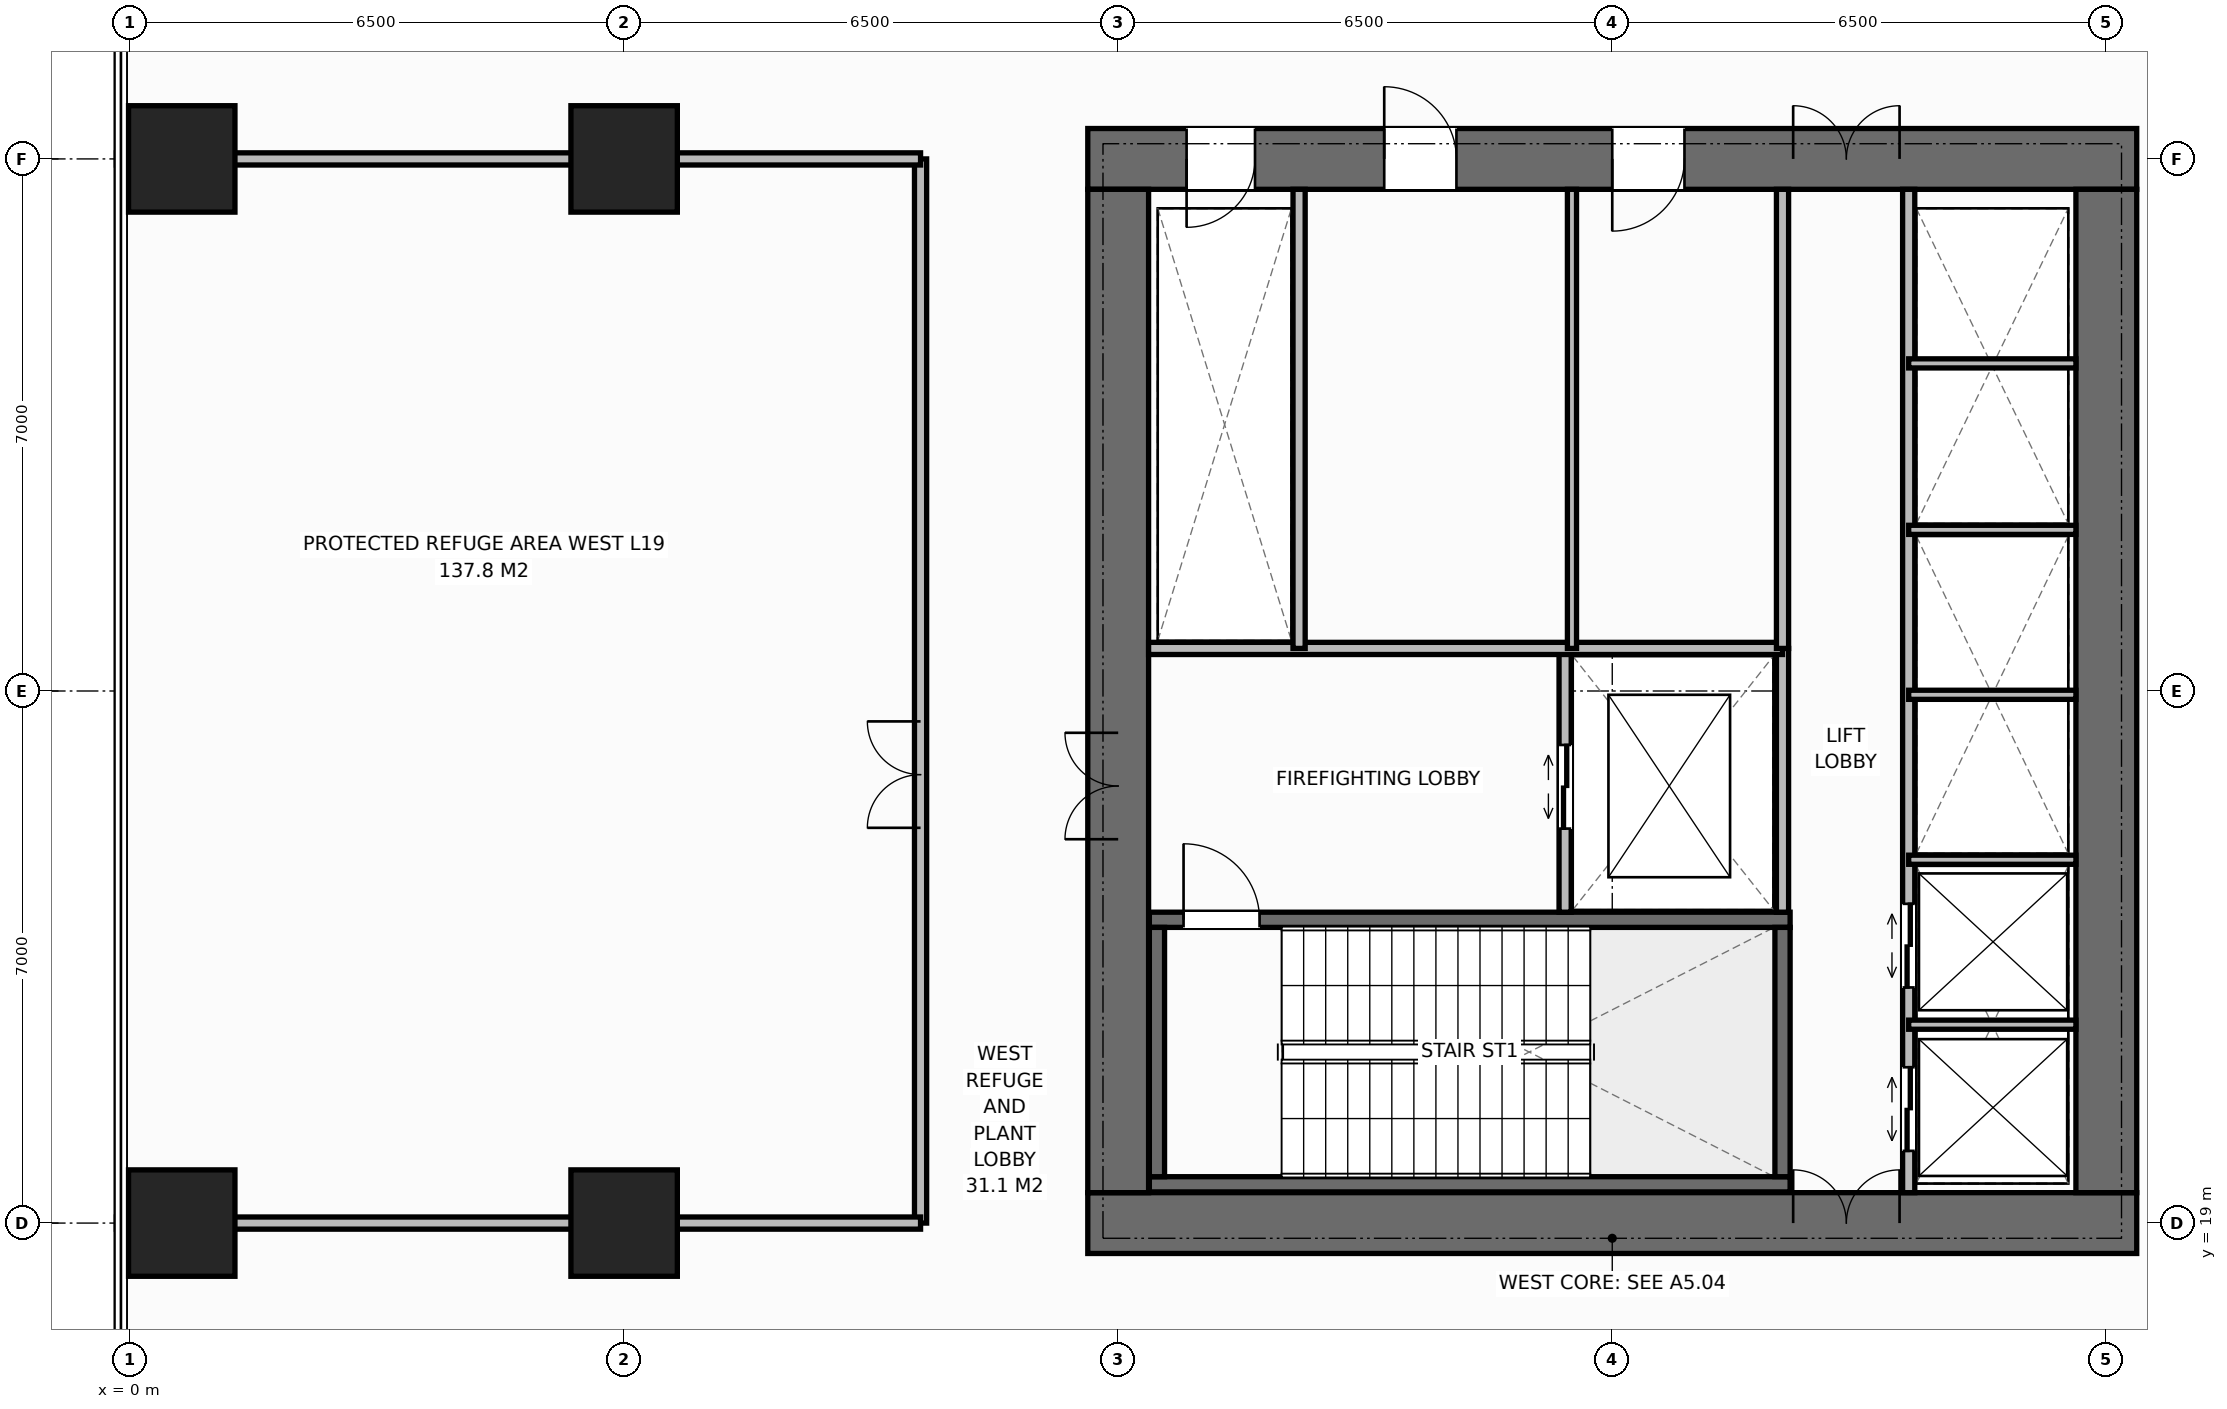
"""IFC4 building model, lengths in metres.
Left out: names, types, materials, properties, quantities, classifications, styles, units other than length and angle.
Written with IfcOpenShell. Run it as: python <this file> out.ifc"""

import sys

from ifc_helpers import new_model, si_unit, direction, frame, frame_2d, origin, origin_2d, place, context, subcontext, project, spatial, rectangle, extrude, element, fill, save


model = new_model("IFC4")
c1 = context("Model", 3, precision=1e-05, world=origin(), true_north=direction((0.0, 1.0)))
c2 = subcontext(c1, "Body", "Model", "MODEL_VIEW")
j1 = project(units=[si_unit("LENGTHUNIT", "METRE"), si_unit("PLANEANGLEUNIT", "RADIAN")], contexts=[c1])
p1 = place(None, origin())
s1 = spatial("IfcSite", under=j1, at=p1, CompositionType="ELEMENT")
p2 = place(p1, origin())
s2 = spatial("IfcBuilding", under=s1, at=p2, CompositionType="ELEMENT")
p3 = place(p2, frame((0.0, 0.0, 81.0)))
s3 = spatial("IfcBuildingStorey", under=s2, at=p3, CompositionType="ELEMENT", Elevation=81.0)
p4 = place(p3, frame((12.6, 19.0, 0.0), z_axis=(0.0, 0.0, 1.0), x_axis=(1.0, 0.0, 0.0)))
e1 = element("IfcWall", 1, at=p4, inside=s3, PredefinedType="SHEAR", context=c2, shape_type="SweptSolid", body=[
    extrude(rectangle(XDim=13.8, YDim=0.8, at=frame_2d((6.9, 0.0))), origin(), (0.0, 0.0, 1.0), 5.0),
])
p5 = place(p4, frame((9.28, 0.0, 0.0)))
e2 = element("IfcOpeningElement", 2, at=p5, cuts=e1, PredefinedType="OPENING", context=c2, shape_type="SweptSolid", body=[
    extrude(rectangle(XDim=1.4, YDim=2.2, at=frame_2d((0.7, 1.1))), frame((0.0, 0.41, 0.0), z_axis=(0.0, -1.0, 0.0), x_axis=(1.0, 0.0, 0.0)), (0.0, 0.0, 1.0), 0.82),
])
p6 = place(p3, frame((12.6, 33.0, 0.0), z_axis=(0.0, 0.0, 1.0), x_axis=(1.0, 0.0, 0.0)))
e3 = element("IfcWall", 3, at=p6, inside=s3, PredefinedType="SHEAR", context=c2, shape_type="SweptSolid", body=[
    extrude(rectangle(XDim=13.8, YDim=0.8, at=frame_2d((6.9, 0.0))), origin(), (0.0, 0.0, 1.0), 5.0),
])
p7 = place(p6, frame((1.3, 0.0, 0.0)))
e4 = element("IfcOpeningElement", 4, at=p7, cuts=e3, PredefinedType="OPENING", context=c2, shape_type="SweptSolid", body=[
    extrude(rectangle(XDim=0.9, YDim=2.15, at=frame_2d((0.45, 1.075))), frame((0.0, 0.41, 0.0), z_axis=(0.0, -1.0, 0.0), x_axis=(1.0, 0.0, 0.0)), (0.0, 0.0, 1.0), 0.82),
])
p8 = place(p6, frame((3.9, 0.0, 0.0)))
e5 = element("IfcOpeningElement", 5, at=p8, cuts=e3, PredefinedType="OPENING", context=c2, shape_type="SweptSolid", body=[
    extrude(rectangle(XDim=0.95, YDim=2.15, at=frame_2d((0.475, 1.075))), frame((0.0, 0.41, 0.0), z_axis=(0.0, -1.0, 0.0), x_axis=(1.0, 0.0, 0.0)), (0.0, 0.0, 1.0), 0.82),
])
p9 = place(p6, frame((6.9, 0.0, 0.0)))
e6 = element("IfcOpeningElement", 6, at=p9, cuts=e3, PredefinedType="OPENING", context=c2, shape_type="SweptSolid", body=[
    extrude(rectangle(XDim=0.95, YDim=2.15, at=frame_2d((0.475, 1.075))), frame((0.0, 0.41, 0.0), z_axis=(0.0, -1.0, 0.0), x_axis=(1.0, 0.0, 0.0)), (0.0, 0.0, 1.0), 0.82),
])
p10 = place(p6, frame((9.28, 0.0, 0.0)))
e7 = element("IfcOpeningElement", 7, at=p10, cuts=e3, PredefinedType="OPENING", context=c2, shape_type="SweptSolid", body=[
    extrude(rectangle(XDim=1.4, YDim=2.2, at=frame_2d((0.7, 1.1))), frame((0.0, 0.41, 0.0), z_axis=(0.0, -1.0, 0.0), x_axis=(1.0, 0.0, 0.0)), (0.0, 0.0, 1.0), 0.82),
])
p11 = place(p3, frame((13.0, 19.4, 0.0), z_axis=(0.0, 0.0, 1.0), x_axis=(0.0, 1.0, 0.0)))
e8 = element("IfcWall", 8, at=p11, inside=s3, PredefinedType="SHEAR", context=c2, shape_type="SweptSolid", body=[
    extrude(rectangle(XDim=13.2, YDim=0.8, at=frame_2d((6.6, 0.0))), origin(), (0.0, 0.0, 1.0), 5.0),
])
p12 = place(p11, frame((4.65, 0.0, 0.0)))
e9 = element("IfcOpeningElement", 9, at=p12, cuts=e8, PredefinedType="OPENING", context=c2, shape_type="SweptSolid", body=[
    extrude(rectangle(XDim=1.4, YDim=2.2, at=frame_2d((0.7, 1.1))), frame((0.0, 0.41, 0.0), z_axis=(0.0, -1.0, 0.0), x_axis=(1.0, 0.0, 0.0)), (0.0, 0.0, 1.0), 0.82),
])
p13 = place(p3, frame((26.0, 19.4, 0.0), z_axis=(0.0, 0.0, 1.0), x_axis=(0.0, 1.0, 0.0)))
e10 = element("IfcWall", 10, at=p13, inside=s3, PredefinedType="SHEAR", context=c2, shape_type="SweptSolid", body=[
    extrude(rectangle(XDim=13.2, YDim=0.8, at=frame_2d((6.6, 0.0))), origin(), (0.0, 0.0, 1.0), 5.0),
])
p14 = place(p3, frame((13.41, 19.51, 0.0), z_axis=(0.0, 0.0, 1.0), x_axis=(1.0, 0.0, 0.0)))
e11 = element("IfcWall", 11, at=p14, inside=s3, PredefinedType="SHEAR", context=c2, shape_type="SweptSolid", body=[
    extrude(rectangle(XDim=8.43, YDim=0.2, at=frame_2d((4.215, 0.0))), origin(), (0.0, 0.0, 1.0), 5.0),
])
p15 = place(p3, frame((13.41, 22.99, 0.0), z_axis=(0.0, 0.0, 1.0), x_axis=(1.0, 0.0, 0.0)))
e12 = element("IfcWall", 12, at=p15, inside=s3, PredefinedType="SHEAR", context=c2, shape_type="SweptSolid", body=[
    extrude(rectangle(XDim=8.43, YDim=0.2, at=frame_2d((4.215, 0.0))), origin(), (0.0, 0.0, 1.0), 5.0),
])
p16 = place(p15, frame((0.45, 0.0, 0.0)))
e13 = element("IfcOpeningElement", 13, at=p16, cuts=e12, PredefinedType="OPENING", context=c2, shape_type="SweptSolid", body=[
    extrude(rectangle(XDim=1.0, YDim=2.15, at=frame_2d((0.5, 1.075))), frame((0.0, 0.11, 0.0), z_axis=(0.0, -1.0, 0.0), x_axis=(1.0, 0.0, 0.0)), (0.0, 0.0, 1.0), 0.22),
])
for number, where, z_axis, x_axis in (
    (14, (13.51, 19.61, 0.0), (0.0, 0.0, 1.0), (0.0, 1.0, 0.0)),
    (15, (21.74, 19.61, 0.0), (0.0, 0.0, 1.0), (0.0, 1.0, 0.0)),
):
    element("IfcWall", number, at=place(p3, frame(where, z_axis=z_axis, x_axis=x_axis)), inside=s3, PredefinedType="SHEAR", context=c2, shape_type="SweptSolid", body=[
        extrude(rectangle(XDim=3.28, YDim=0.2, at=frame_2d((1.64, 0.0))), origin(), (0.0, 0.0, 1.0), 5.0),
    ])
for number, where, z_axis, x_axis in (
    (16, (6.5, 19.0, 0.0), (0.0, 0.0, 1.0), (1.0, 0.0, 0.0)),
    (17, (6.5, 33.0, 0.0), (0.0, 0.0, 1.0), (1.0, 0.0, 0.0)),
    (18, (0.68, 19.0, 0.0), (0.0, 0.0, 1.0), (1.0, 0.0, 0.0)),
    (19, (0.68, 33.0, 0.0), (0.0, 0.0, 1.0), (1.0, 0.0, 0.0)),
):
    element("IfcColumn", number, at=place(p3, frame(where, z_axis=z_axis, x_axis=x_axis)), inside=s3, PredefinedType="COLUMN", context=c2, shape_type="SweptSolid", body=[
        extrude(rectangle(XDim=1.4, YDim=1.4, at=origin_2d()), origin(), (0.0, 0.0, 1.0), 5.0),
    ])
p17 = place(p3, frame((21.74, 23.09, 0.0), z_axis=(0.0, 0.0, 1.0), x_axis=(0.0, 1.0, 0.0)))
e20 = element("IfcWall", 20, at=p17, inside=s3, PredefinedType="STANDARD", context=c2, shape_type="SweptSolid", body=[
    extrude(rectangle(XDim=3.47, YDim=0.16, at=frame_2d((1.735, 0.0))), origin(), (0.0, 0.0, 1.0), 4.765),
])
p18 = place(p3, frame((18.88, 23.09, 0.0), z_axis=(0.0, 0.0, 1.0), x_axis=(0.0, 1.0, 0.0)))
e21 = element("IfcWall", 21, at=p18, inside=s3, PredefinedType="STANDARD", context=c2, shape_type="SweptSolid", body=[
    extrude(rectangle(XDim=3.47, YDim=0.16, at=frame_2d((1.735, 0.0))), origin(), (0.0, 0.0, 1.0), 4.765),
])
p19 = place(p18, frame((1.1, 0.0, 0.0)))
e22 = element("IfcOpeningElement", 22, at=p19, cuts=e21, PredefinedType="OPENING", context=c2, shape_type="SweptSolid", body=[
    extrude(rectangle(XDim=1.1, YDim=2.2, at=frame_2d((0.55, 1.1))), frame((0.0, 0.09, 0.0), z_axis=(0.0, -1.0, 0.0), x_axis=(1.0, 0.0, 0.0)), (0.0, 0.0, 1.0), 0.18),
])
p20 = place(p3, frame((13.4, 26.56, 0.0), z_axis=(0.0, 0.0, 1.0), x_axis=(1.0, 0.0, 0.0)))
e23 = element("IfcWall", 23, at=p20, inside=s3, PredefinedType="STANDARD", context=c2, shape_type="SweptSolid", body=[
    extrude(rectangle(XDim=8.34, YDim=0.16, at=frame_2d((4.17, 0.0))), origin(), (0.0, 0.0, 1.0), 4.765),
])
p21 = place(p3, frame((15.38, 26.56, 0.0), z_axis=(0.0, 0.0, 1.0), x_axis=(0.0, 1.0, 0.0)))
e24 = element("IfcWall", 24, at=p21, inside=s3, PredefinedType="STANDARD", context=c2, shape_type="SweptSolid", body=[
    extrude(rectangle(XDim=6.04, YDim=0.16, at=frame_2d((3.02, 0.0))), origin(), (0.0, 0.0, 1.0), 4.765),
])
p22 = place(p3, frame((18.97, 26.56, 0.0), z_axis=(0.0, 0.0, 1.0), x_axis=(0.0, 1.0, 0.0)))
e25 = element("IfcWall", 25, at=p22, inside=s3, PredefinedType="PARTITIONING", context=c2, shape_type="SweptSolid", body=[
    extrude(rectangle(XDim=6.04, YDim=0.12, at=frame_2d((3.02, 0.0))), origin(), (0.0, 0.0, 1.0), 4.765),
])
p23 = place(p3, frame((21.74, 26.56, 0.0), z_axis=(0.0, 0.0, 1.0), x_axis=(0.0, 1.0, 0.0)))
e26 = element("IfcWall", 26, at=p23, inside=s3, PredefinedType="STANDARD", context=c2, shape_type="SweptSolid", body=[
    extrude(rectangle(XDim=6.04, YDim=0.16, at=frame_2d((3.02, 0.0))), origin(), (0.0, 0.0, 1.0), 4.765),
])
p24 = place(p3, frame((23.4, 19.4, 0.0), z_axis=(0.0, 0.0, 1.0), x_axis=(0.0, 1.0, 0.0)))
e27 = element("IfcWall", 27, at=p24, inside=s3, PredefinedType="STANDARD", context=c2, shape_type="SweptSolid", body=[
    extrude(rectangle(XDim=13.2, YDim=0.16, at=frame_2d((6.6, 0.0))), origin(), (0.0, 0.0, 1.0), 4.765),
])
p25 = place(p24, frame((0.55, 0.0, 0.0)))
e28 = element("IfcOpeningElement", 28, at=p25, cuts=e27, PredefinedType="OPENING", context=c2, shape_type="SweptSolid", body=[
    extrude(rectangle(XDim=1.1, YDim=2.2, at=frame_2d((0.55, 1.1))), frame((0.0, 0.09, 0.0), z_axis=(0.0, -1.0, 0.0), x_axis=(1.0, 0.0, 0.0)), (0.0, 0.0, 1.0), 0.18),
])
p26 = place(p24, frame((2.7, 0.0, 0.0)))
e29 = element("IfcOpeningElement", 29, at=p26, cuts=e27, PredefinedType="OPENING", context=c2, shape_type="SweptSolid", body=[
    extrude(rectangle(XDim=1.1, YDim=2.2, at=frame_2d((0.55, 1.1))), frame((0.0, 0.09, 0.0), z_axis=(0.0, -1.0, 0.0), x_axis=(1.0, 0.0, 0.0)), (0.0, 0.0, 1.0), 0.18),
])
for number, where, z_axis, x_axis in (
    (30, (23.4, 21.61, 0.0), (0.0, 0.0, 1.0), (1.0, 0.0, 0.0)),
    (31, (23.4, 23.78, 0.0), (0.0, 0.0, 1.0), (1.0, 0.0, 0.0)),
    (32, (23.4, 25.95, 0.0), (0.0, 0.0, 1.0), (1.0, 0.0, 0.0)),
    (33, (23.4, 28.12, 0.0), (0.0, 0.0, 1.0), (1.0, 0.0, 0.0)),
    (34, (23.4, 30.31, 0.0), (0.0, 0.0, 1.0), (1.0, 0.0, 0.0)),
):
    element("IfcWall", number, at=place(p3, frame(where, z_axis=z_axis, x_axis=x_axis)), inside=s3, PredefinedType="PARTITIONING", context=c2, shape_type="SweptSolid", body=[
        extrude(rectangle(XDim=2.2, YDim=0.12, at=frame_2d((1.1, 0.0))), origin(), (0.0, 0.0, 1.0), 4.765),
    ])
p27 = place(p3, frame((10.4, 19.0, 0.0), z_axis=(0.0, 0.0, 1.0), x_axis=(0.0, 1.0, 0.0)))
e35 = element("IfcWall", 35, at=p27, inside=s3, PredefinedType="STANDARD", context=c2, shape_type="SweptSolid", body=[
    extrude(rectangle(XDim=14.0, YDim=0.16, at=frame_2d((7.0, 0.0))), origin(), (0.0, 0.0, 1.0), 4.765),
])
p28 = place(p27, frame((5.2, 0.0, 0.0)))
e36 = element("IfcOpeningElement", 36, at=p28, cuts=e35, PredefinedType="OPENING", context=c2, shape_type="SweptSolid", body=[
    extrude(rectangle(XDim=1.4, YDim=2.2, at=frame_2d((0.7, 1.1))), frame((0.0, 0.09, 0.0), z_axis=(0.0, -1.0, 0.0), x_axis=(1.0, 0.0, 0.0)), (0.0, 0.0, 1.0), 0.18),
])
for number, where, z_axis, x_axis in (
    (37, (-0.18, 19.0, 0.0), (0.0, 0.0, 1.0), (1.0, 0.0, 0.0)),
    (38, (-0.18, 33.0, 0.0), (0.0, 0.0, 1.0), (1.0, 0.0, 0.0)),
):
    element("IfcWall", number, at=place(p3, frame(where, z_axis=z_axis, x_axis=x_axis)), inside=s3, PredefinedType="STANDARD", context=c2, shape_type="SweptSolid", body=[
        extrude(rectangle(XDim=10.58, YDim=0.16, at=frame_2d((5.29, 0.0))), origin(), (0.0, 0.0, 1.0), 3.245),
    ])
p29 = place(p16, origin())
e39 = element("IfcDoor", 39, at=p29, inside=s3, OperationType="SINGLE_SWING_LEFT", PredefinedType="DOOR", context=c2, shape_type="SweptSolid", body=[
    extrude(rectangle(XDim=1.0, YDim=2.15, at=frame_2d((0.5, 1.075))), frame((0.0, 0.025, 0.0), z_axis=(0.0, -1.0, 0.0), x_axis=(1.0, 0.0, 0.0)), (0.0, 0.0, 1.0), 0.05),
])
fill(e13, e39)
p30 = place(p12, origin())
e40 = element("IfcDoor", 40, at=p30, inside=s3, OperationType="DOUBLE_DOOR_SINGLE_SWING", PredefinedType="DOOR", context=c2, shape_type="SweptSolid", body=[
    extrude(rectangle(XDim=1.4, YDim=2.2, at=frame_2d((0.7, 1.1))), frame((0.0, 0.025, 0.0), z_axis=(0.0, -1.0, 0.0), x_axis=(1.0, 0.0, 0.0)), (0.0, 0.0, 1.0), 0.05),
])
fill(e9, e40)
p31 = place(p19, origin())
e41 = element("IfcDoor", 41, at=p31, inside=s3, OperationType="DOUBLE_DOOR_SLIDING", PredefinedType="DOOR", context=c2, shape_type="SweptSolid", body=[
    extrude(rectangle(XDim=1.1, YDim=2.2, at=frame_2d((0.55, 1.1))), frame((0.0, 0.025, 0.0), z_axis=(0.0, -1.0, 0.0), x_axis=(1.0, 0.0, 0.0)), (0.0, 0.0, 1.0), 0.05),
])
fill(e22, e41)
p32 = place(p7, origin())
e42 = element("IfcDoor", 42, at=p32, inside=s3, OperationType="SINGLE_SWING_RIGHT", PredefinedType="DOOR", context=c2, shape_type="SweptSolid", body=[
    extrude(rectangle(XDim=0.9, YDim=2.15, at=frame_2d((0.45, 1.075))), frame((0.0, -0.075, 0.0), z_axis=(0.0, -1.0, 0.0), x_axis=(1.0, 0.0, 0.0)), (0.0, 0.0, 1.0), 0.05),
])
fill(e4, e42)
p33 = place(p8, origin())
e43 = element("IfcDoor", 43, at=p33, inside=s3, OperationType="SINGLE_SWING_LEFT", PredefinedType="DOOR", context=c2, shape_type="SweptSolid", body=[
    extrude(rectangle(XDim=0.95, YDim=2.15, at=frame_2d((0.475, 1.075))), frame((0.0, -0.075, 0.0), z_axis=(0.0, -1.0, 0.0), x_axis=(1.0, 0.0, 0.0)), (0.0, 0.0, 1.0), 0.05),
])
fill(e5, e43)
p34 = place(p9, origin())
e44 = element("IfcDoor", 44, at=p34, inside=s3, OperationType="SINGLE_SWING_RIGHT", PredefinedType="DOOR", context=c2, shape_type="SweptSolid", body=[
    extrude(rectangle(XDim=0.95, YDim=2.15, at=frame_2d((0.475, 1.075))), frame((0.0, -0.075, 0.0), z_axis=(0.0, -1.0, 0.0), x_axis=(1.0, 0.0, 0.0)), (0.0, 0.0, 1.0), 0.05),
])
fill(e6, e44)
p35 = place(p5, origin())
e45 = element("IfcDoor", 45, at=p35, inside=s3, OperationType="DOUBLE_DOOR_SINGLE_SWING", PredefinedType="DOOR", context=c2, shape_type="SweptSolid", body=[
    extrude(rectangle(XDim=1.4, YDim=2.2, at=frame_2d((0.7, 1.1))), frame((0.0, 0.125, 0.0), z_axis=(0.0, -1.0, 0.0), x_axis=(1.0, 0.0, 0.0)), (0.0, 0.0, 1.0), 0.05),
])
fill(e2, e45)
p36 = place(p10, origin())
e46 = element("IfcDoor", 46, at=p36, inside=s3, OperationType="DOUBLE_DOOR_SINGLE_SWING", PredefinedType="DOOR", context=c2, shape_type="SweptSolid", body=[
    extrude(rectangle(XDim=1.4, YDim=2.2, at=frame_2d((0.7, 1.1))), frame((0.0, -0.075, 0.0), z_axis=(0.0, -1.0, 0.0), x_axis=(1.0, 0.0, 0.0)), (0.0, 0.0, 1.0), 0.05),
])
fill(e7, e46)
p37 = place(p25, origin())
e47 = element("IfcDoor", 47, at=p37, inside=s3, OperationType="DOUBLE_DOOR_SLIDING", PredefinedType="DOOR", context=c2, shape_type="SweptSolid", body=[
    extrude(rectangle(XDim=1.1, YDim=2.2, at=frame_2d((0.55, 1.1))), frame((0.0, 0.025, 0.0), z_axis=(0.0, -1.0, 0.0), x_axis=(1.0, 0.0, 0.0)), (0.0, 0.0, 1.0), 0.05),
])
fill(e28, e47)
p38 = place(p26, origin())
e48 = element("IfcDoor", 48, at=p38, inside=s3, OperationType="DOUBLE_DOOR_SLIDING", PredefinedType="DOOR", context=c2, shape_type="SweptSolid", body=[
    extrude(rectangle(XDim=1.1, YDim=2.2, at=frame_2d((0.55, 1.1))), frame((0.0, 0.025, 0.0), z_axis=(0.0, -1.0, 0.0), x_axis=(1.0, 0.0, 0.0)), (0.0, 0.0, 1.0), 0.05),
])
fill(e29, e48)
p39 = place(p28, origin())
e49 = element("IfcDoor", 49, at=p39, inside=s3, OperationType="DOUBLE_DOOR_SINGLE_SWING", PredefinedType="DOOR", context=c2, shape_type="SweptSolid", body=[
    extrude(rectangle(XDim=1.4, YDim=2.2, at=frame_2d((0.7, 1.1))), frame((0.0, 0.025, 0.0), z_axis=(0.0, -1.0, 0.0), x_axis=(1.0, 0.0, 0.0)), (0.0, 0.0, 1.0), 0.05),
])
fill(e36, e49)
save(model, sys.argv[1])
